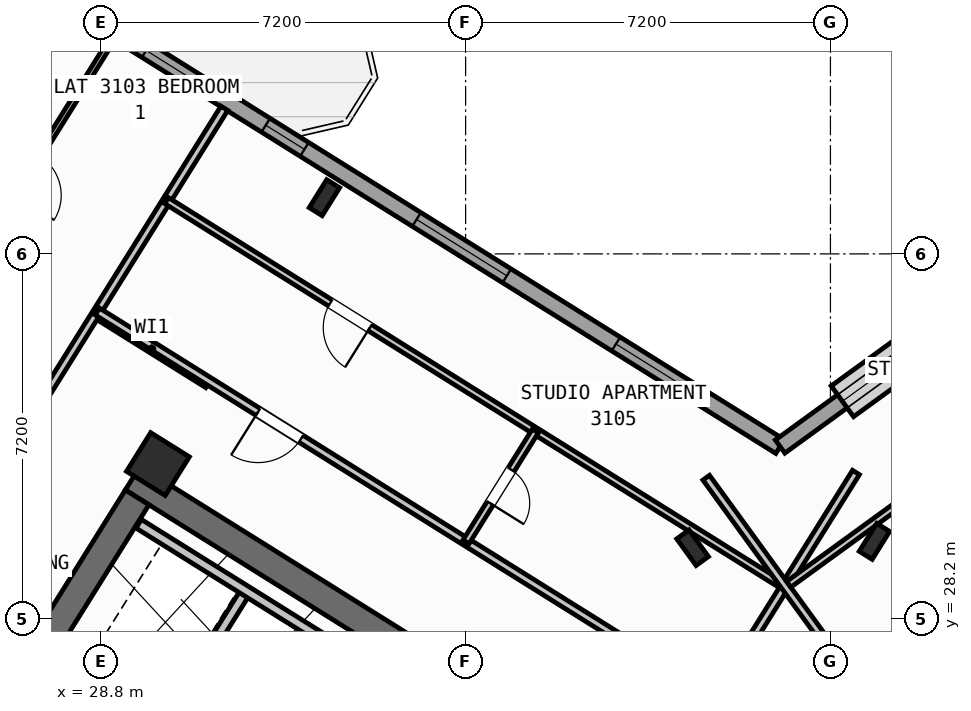
"""IFC4 building model, lengths in metres.
Left out: names, types, materials, properties, quantities, classifications, styles, units other than length and angle.
Written with IfcOpenShell. Run it as: python <this file> out.ifc"""

import sys

from ifc_helpers import new_model, si_unit, direction, frame, frame_2d, origin, origin_2d, place, context, subcontext, project, spatial, rectangle, hollow_rectangle, i_section, extrude, source, transform, mapped, element, fill, save


model = new_model("IFC4")
c1 = context("Model", 3, precision=1e-05, world=origin(), true_north=direction((0.0, 1.0)))
c2 = subcontext(c1, "Body", "Model", "MODEL_VIEW")
j1 = project(units=[si_unit("LENGTHUNIT", "METRE"), si_unit("PLANEANGLEUNIT", "RADIAN")], contexts=[c1])
p1 = place(None, origin())
s1 = spatial("IfcSite", under=j1, at=p1, CompositionType="ELEMENT")
p2 = place(p1, origin())
s2 = spatial("IfcBuilding", under=s1, at=p2, CompositionType="ELEMENT")
p3 = place(p2, frame((0.0, 0.0, 123.3)))
s3 = spatial("IfcBuildingStorey", under=s2, at=p3, CompositionType="ELEMENT", Elevation=123.3)
p4 = place(p3, frame((40.573, 24.01, 0.0), z_axis=(0.0, 0.0, 1.0), x_axis=(-0.848047359947, 0.529920442413, 0.0)))
e1 = element("IfcWall", 1, at=p4, inside=s3, PredefinedType="SHEAR", context=c2, shape_type="SweptSolid", body=[
    extrude(rectangle(XDim=13.14, YDim=0.55, at=frame_2d((6.57, 0.0))), origin(), (0.0, 0.0, 1.0), 4.22),
])
p5 = place(p3, frame((29.517, 30.594, 0.0), z_axis=(0.0, 0.0, 1.0), x_axis=(-0.529906864564, -0.848055844204, 0.0)))
e2 = element("IfcWall", 2, at=p5, inside=s3, PredefinedType="SHEAR", context=c2, shape_type="SweptSolid", body=[
    extrude(rectangle(XDim=3.575, YDim=0.55, at=frame_2d((1.788, 0.0))), origin(), (0.0, 0.0, 1.0), 4.22),
])
p6 = place(p3, frame((44.365, 24.142, 0.0), z_axis=(0.0, 0.0, 1.0), x_axis=(0.809024304885, 0.587775190107, 0.0)))
e3 = element("IfcWall", 3, at=p6, inside=s3, PredefinedType="SHEAR", context=c2, shape_type="SweptSolid", body=[
    extrude(rectangle(XDim=12.34, YDim=0.55, at=frame_2d((6.17, 0.0))), origin(), (0.0, 0.0, 1.0), 4.22),
])
m1 = source(origin(), c2, "Body", "SweptSolid", [
    extrude(i_section(OverallWidth=0.3, OverallDepth=0.65, WebThickness=0.016, FlangeThickness=0.031, at=origin_2d()), origin(), (0.0, 0.0, 1.0), 4.5),
])
for number, where, z_axis, x_axis in (
    (4, (44.068, 29.726, 0.0), (0.0, 0.0, 1.0), (-0.848, 0.53, 0.0)),
    (5, (33.213, 36.509, 0.0), (0.0, 0.0, 1.0), (-0.848, 0.53, 0.0)),
):
    element("IfcColumn", number, at=place(p3, frame(where, z_axis=z_axis, x_axis=x_axis)), inside=s3, PredefinedType="COLUMN", context=c2, shape_type="MappedRepresentation", body=[
        mapped(m1, transform((0.0, 0.0, 0.0), scale=1.0)),
    ])
m2 = source(origin(), c2, "Body", "SweptSolid", [
    extrude(hollow_rectangle(XDim=0.9, YDim=0.9, WallThickness=0.036, at=origin_2d()), origin(), (0.0, 0.0, 1.0), 4.5),
])
p7 = place(p3, frame((29.928, 31.251, 0.0), z_axis=(0.0, 0.0, 1.0), x_axis=(-0.848048096156, 0.529919264233, 0.0)))
e6 = element("IfcColumn", 6, at=p7, inside=s3, PredefinedType="COLUMN", context=c2, shape_type="MappedRepresentation", body=[
    mapped(m2, transform((0.0, 0.0, 0.0), scale=1.0)),
])
p8 = place(p3, frame((40.479, 29.601, 0.0), z_axis=(0.0, 0.0, 1.0), x_axis=(0.809016994375, 0.587785252292, 0.0)))
e7 = element("IfcColumn", 7, at=p8, inside=s3, PredefinedType="COLUMN", context=c2, shape_type="MappedRepresentation", body=[
    mapped(m1, transform((0.0, 0.0, 0.0), scale=1.0)),
])
p9 = place(p3, frame((31.76, 12.183, 0.0), z_axis=(0.0, 0.0, 1.0), x_axis=(-0.848047074256, 0.529920899612, 0.0)))
e8 = element("IfcWall", 8, at=p9, inside=s3, PredefinedType="STANDARD", context=c2, shape_type="SweptSolid", body=[
    extrude(rectangle(XDim=30.652, YDim=0.32, at=frame_2d((15.326, 0.0))), origin(), (0.0, 0.0, 1.0), 4.22),
])
p10 = place(p9, frame((14.966, 0.0, 0.0)))
e9 = element("IfcOpeningElement", 9, at=p10, cuts=e8, PredefinedType="OPENING", context=c2, shape_type="SweptSolid", body=[
    extrude(rectangle(XDim=1.2, YDim=2.15, at=frame_2d((0.6, 1.075))), frame((0.0, 0.17, 0.0), z_axis=(0.0, -1.0, 0.0), x_axis=(1.0, 0.0, 0.0)), (0.0, 0.0, 1.0), 0.34),
])
p11 = place(p9, frame((1.871, 0.0, 0.8)))
e10 = element("IfcOpeningElement", 10, at=p11, cuts=e8, PredefinedType="OPENING", context=c2, shape_type="SweptSolid", body=[
    extrude(rectangle(XDim=2.1, YDim=1.55, at=frame_2d((1.05, 0.775))), frame((0.0, 0.17, 0.0), z_axis=(0.0, -1.0, 0.0), x_axis=(1.0, 0.0, 0.0)), (0.0, 0.0, 1.0), 0.34),
])
p12 = place(p9, frame((6.546, 0.0, 0.8)))
e11 = element("IfcOpeningElement", 11, at=p12, cuts=e8, PredefinedType="OPENING", context=c2, shape_type="SweptSolid", body=[
    extrude(rectangle(XDim=2.1, YDim=1.55, at=frame_2d((1.05, 0.775))), frame((0.0, 0.17, 0.0), z_axis=(0.0, -1.0, 0.0), x_axis=(1.0, 0.0, 0.0)), (0.0, 0.0, 1.0), 0.34),
])
p13 = place(p9, frame((20.508, 0.0, 0.85)))
e12 = element("IfcOpeningElement", 12, at=p13, cuts=e8, PredefinedType="OPENING", context=c2, shape_type="SweptSolid", body=[
    extrude(rectangle(XDim=1.5, YDim=1.5, at=frame_2d((0.75, 0.75))), frame((0.0, 0.17, 0.0), z_axis=(0.0, -1.0, 0.0), x_axis=(1.0, 0.0, 0.0)), (0.0, 0.0, 1.0), 0.34),
])
p14 = place(p9, frame((27.253, 0.0, 0.95)))
e13 = element("IfcOpeningElement", 13, at=p14, cuts=e8, PredefinedType="OPENING", context=c2, shape_type="SweptSolid", body=[
    extrude(rectangle(XDim=1.2, YDim=1.4, at=frame_2d((0.6, 0.7))), frame((0.0, 0.17, 0.0), z_axis=(0.0, -1.0, 0.0), x_axis=(1.0, 0.0, 0.0)), (0.0, 0.0, 1.0), 0.34),
])
p15 = place(p3, frame((17.424, 47.083, 0.0), z_axis=(0.0, 0.0, 1.0), x_axis=(0.848049927979, -0.529916332693, 0.0)))
e14 = element("IfcWall", 14, at=p15, inside=s3, PredefinedType="STANDARD", context=c2, shape_type="SweptSolid", body=[
    extrude(rectangle(XDim=29.223, YDim=0.32, at=frame_2d((14.612, 0.0))), origin(), (0.0, 0.0, 1.0), 4.22),
])
p16 = place(p15, frame((8.839, 0.0, 0.0)))
e15 = element("IfcOpeningElement", 15, at=p16, cuts=e14, PredefinedType="OPENING", context=c2, shape_type="SweptSolid", body=[
    extrude(rectangle(XDim=1.05, YDim=2.15, at=frame_2d((0.525, 1.075))), frame((0.0, 0.17, 0.0), z_axis=(0.0, -1.0, 0.0), x_axis=(1.0, 0.0, 0.0)), (0.0, 0.0, 1.0), 0.34),
])
p17 = place(p15, frame((0.719, 0.0, 0.85)))
e16 = element("IfcOpeningElement", 16, at=p17, cuts=e14, PredefinedType="OPENING", context=c2, shape_type="SweptSolid", body=[
    extrude(rectangle(XDim=1.8, YDim=1.5, at=frame_2d((0.9, 0.75))), frame((0.0, 0.17, 0.0), z_axis=(0.0, -1.0, 0.0), x_axis=(1.0, 0.0, 0.0)), (0.0, 0.0, 1.0), 0.34),
])
p18 = place(p15, frame((3.981, 0.0, 0.85)))
e17 = element("IfcOpeningElement", 17, at=p18, cuts=e14, PredefinedType="OPENING", context=c2, shape_type="SweptSolid", body=[
    extrude(rectangle(XDim=1.5, YDim=1.5, at=frame_2d((0.75, 0.75))), frame((0.0, 0.17, 0.0), z_axis=(0.0, -1.0, 0.0), x_axis=(1.0, 0.0, 0.0)), (0.0, 0.0, 1.0), 0.34),
])
p19 = place(p15, frame((7.021, 0.0, 0.95)))
e18 = element("IfcOpeningElement", 18, at=p19, cuts=e14, PredefinedType="OPENING", context=c2, shape_type="SweptSolid", body=[
    extrude(rectangle(XDim=1.2, YDim=1.4, at=frame_2d((0.6, 0.7))), frame((0.0, 0.17, 0.0), z_axis=(0.0, -1.0, 0.0), x_axis=(1.0, 0.0, 0.0)), (0.0, 0.0, 1.0), 0.34),
])
p20 = place(p15, frame((14.471, 0.0, 0.95)))
e19 = element("IfcOpeningElement", 19, at=p20, cuts=e14, PredefinedType="OPENING", context=c2, shape_type="SweptSolid", body=[
    extrude(rectangle(XDim=1.2, YDim=1.4, at=frame_2d((0.6, 0.7))), frame((0.0, 0.17, 0.0), z_axis=(0.0, -1.0, 0.0), x_axis=(1.0, 0.0, 0.0)), (0.0, 0.0, 1.0), 0.34),
])
p21 = place(p15, frame((17.254, 0.0, 1.0)))
e20 = element("IfcOpeningElement", 20, at=p21, cuts=e14, PredefinedType="OPENING", context=c2, shape_type="SweptSolid", body=[
    extrude(rectangle(XDim=0.9, YDim=1.25, at=frame_2d((0.45, 0.625))), frame((0.0, 0.17, 0.0), z_axis=(0.0, -1.0, 0.0), x_axis=(1.0, 0.0, 0.0)), (0.0, 0.0, 1.0), 0.34),
])
p22 = place(p15, frame((20.764, 0.0, 0.8)))
e21 = element("IfcOpeningElement", 21, at=p22, cuts=e14, PredefinedType="OPENING", context=c2, shape_type="SweptSolid", body=[
    extrude(rectangle(XDim=2.1, YDim=1.55, at=frame_2d((1.05, 0.775))), frame((0.0, 0.17, 0.0), z_axis=(0.0, -1.0, 0.0), x_axis=(1.0, 0.0, 0.0)), (0.0, 0.0, 1.0), 0.34),
])
p23 = place(p15, frame((25.403, 0.0, 0.8)))
e22 = element("IfcOpeningElement", 22, at=p23, cuts=e14, PredefinedType="OPENING", context=c2, shape_type="SweptSolid", body=[
    extrude(rectangle(XDim=2.1, YDim=1.55, at=frame_2d((1.05, 0.775))), frame((0.0, 0.17, 0.0), z_axis=(0.0, -1.0, 0.0), x_axis=(1.0, 0.0, 0.0)), (0.0, 0.0, 1.0), 0.34),
])
p24 = place(p3, frame((42.207, 31.597, 0.0), z_axis=(0.0, 0.0, 1.0), x_axis=(0.809020333377, 0.587780656523, 0.0)))
e23 = element("IfcWall", 23, at=p24, inside=s3, PredefinedType="STANDARD", context=c2, shape_type="SweptSolid", body=[
    extrude(rectangle(XDim=15.223, YDim=0.32, at=frame_2d((7.611, 0.0))), origin(), (0.0, 0.0, 1.0), 4.22),
])
p25 = place(p24, frame((12.82, 0.0, 0.0)))
e24 = element("IfcOpeningElement", 24, at=p25, cuts=e23, PredefinedType="OPENING", context=c2, shape_type="SweptSolid", body=[
    extrude(rectangle(XDim=1.05, YDim=2.15, at=frame_2d((0.525, 1.075))), frame((0.0, 0.17, 0.0), z_axis=(0.0, -1.0, 0.0), x_axis=(1.0, 0.0, 0.0)), (0.0, 0.0, 1.0), 0.34),
])
p26 = place(p24, frame((1.52, 0.0, 0.8)))
e25 = element("IfcOpeningElement", 25, at=p26, cuts=e23, PredefinedType="OPENING", context=c2, shape_type="SweptSolid", body=[
    extrude(rectangle(XDim=2.1, YDim=1.55, at=frame_2d((1.05, 0.775))), frame((0.0, 0.17, 0.0), z_axis=(0.0, -1.0, 0.0), x_axis=(1.0, 0.0, 0.0)), (0.0, 0.0, 1.0), 0.34),
])
p27 = place(p24, frame((5.76, 0.0, 0.8)))
e26 = element("IfcOpeningElement", 26, at=p27, cuts=e23, PredefinedType="OPENING", context=c2, shape_type="SweptSolid", body=[
    extrude(rectangle(XDim=2.1, YDim=1.55, at=frame_2d((1.05, 0.775))), frame((0.0, 0.17, 0.0), z_axis=(0.0, -1.0, 0.0), x_axis=(1.0, 0.0, 0.0)), (0.0, 0.0, 1.0), 0.34),
])
p28 = place(p24, frame((10.219, 0.0, 1.0)))
e27 = element("IfcOpeningElement", 27, at=p28, cuts=e23, PredefinedType="OPENING", context=c2, shape_type="SweptSolid", body=[
    extrude(rectangle(XDim=0.9, YDim=1.25, at=frame_2d((0.45, 0.625))), frame((0.0, 0.17, 0.0), z_axis=(0.0, -1.0, 0.0), x_axis=(1.0, 0.0, 0.0)), (0.0, 0.0, 1.0), 0.34),
])
p29 = place(p3, frame((31.645, 28.716, 0.0), z_axis=(0.0, 0.0, 1.0), x_axis=(-0.52986693015, -0.848080795876, 0.0)))
e28 = element("IfcWall", 28, at=p29, inside=s3, PredefinedType="STANDARD", context=c2, shape_type="SweptSolid", body=[
    extrude(rectangle(XDim=2.66, YDim=0.2, at=frame_2d((1.33, 0.0))), origin(), (0.0, 0.0, 1.0), 4.21),
])
p30 = place(p3, frame((33.363, 27.69, 0.0), z_axis=(0.0, 0.0, 1.0), x_axis=(-0.848047090064, 0.529920874315, 0.0)))
e29 = element("IfcWall", 29, at=p30, inside=s3, PredefinedType="STANDARD", context=c2, shape_type="SweptSolid", body=[
    extrude(rectangle(XDim=4.498, YDim=0.2, at=frame_2d((2.249, 0.0))), origin(), (0.0, 0.0, 1.0), 4.21),
])
p31 = place(p3, frame((30.914, 32.829, 0.0), z_axis=(0.0, 0.0, 1.0), x_axis=(-0.848008813643, 0.529982124211, 0.0)))
e30 = element("IfcWall", 30, at=p31, inside=s3, PredefinedType="PARTITIONING", context=c2, shape_type="SweptSolid", body=[
    extrude(rectangle(XDim=2.61, YDim=0.16, at=frame_2d((1.305, 0.0))), origin(), (0.0, 0.0, 1.0), 4.21),
])
p32 = place(p3, frame((31.239, 38.274, 0.0), z_axis=(0.0, 0.0, 1.0), x_axis=(-0.529920220799, -0.848047498427, 0.0)))
e31 = element("IfcWall", 31, at=p32, inside=s3, PredefinedType="PARTITIONING", context=c2, shape_type="SweptSolid", body=[
    extrude(rectangle(XDim=9.2, YDim=0.16, at=frame_2d((4.6, 0.0))), origin(), (0.0, 0.0, 1.0), 4.21),
])
p33 = place(p3, frame((29.177, 39.881, 0.0), z_axis=(0.0, 0.0, 1.0), x_axis=(-0.529930649952, -0.848040981463, 0.0)))
e32 = element("IfcWall", 32, at=p33, inside=s3, PredefinedType="PARTITIONING", context=c2, shape_type="SweptSolid", body=[
    extrude(rectangle(XDim=7.07, YDim=0.11, at=frame_2d((3.535, 0.0))), origin(), (0.0, 0.0, 1.0), 4.21),
])
p34 = place(p33, frame((3.0, 0.0, 0.0)))
e33 = element("IfcOpeningElement", 33, at=p34, cuts=e32, PredefinedType="OPENING", context=c2, shape_type="SweptSolid", body=[
    extrude(rectangle(XDim=0.92, YDim=2.08, at=frame_2d((0.46, 1.04))), frame((0.0, 0.065, 0.0), z_axis=(0.0, -1.0, 0.0), x_axis=(1.0, 0.0, 0.0)), (0.0, 0.0, 1.0), 0.13),
])
p35 = place(p3, frame((41.936, 26.012, 0.0), z_axis=(0.0, 0.0, 1.0), x_axis=(-0.848051154596, 0.529914369676, 0.0)))
e34 = element("IfcWall", 34, at=p35, inside=s3, PredefinedType="PARTITIONING", context=c2, shape_type="SweptSolid", body=[
    extrude(rectangle(XDim=15.57, YDim=0.16, at=frame_2d((7.785, 0.0))), origin(), (0.0, 0.0, 1.0), 4.21),
])
p36 = place(p35, frame((10.83, 0.0, 0.0)))
e35 = element("IfcOpeningElement", 35, at=p36, cuts=e34, PredefinedType="OPENING", context=c2, shape_type="SweptSolid", body=[
    extrude(rectangle(XDim=1.0, YDim=2.1, at=frame_2d((0.5, 1.05))), frame((0.0, 0.09, 0.0), z_axis=(0.0, -1.0, 0.0), x_axis=(1.0, 0.0, 0.0)), (0.0, 0.0, 1.0), 0.18),
])
p37 = place(p3, frame((43.704, 31.086, 0.0), z_axis=(0.0, 0.0, 1.0), x_axis=(-0.529906828443, -0.848055866774, 0.0)))
e36 = element("IfcWall", 36, at=p37, inside=s3, PredefinedType="PARTITIONING", context=c2, shape_type="SweptSolid", body=[
    extrude(rectangle(XDim=5.48, YDim=0.16, at=frame_2d((2.74, 0.0))), origin(), (0.0, 0.0, 1.0), 4.21),
])
p38 = place(p3, frame((42.226, 28.873, 0.0), z_axis=(0.0, 0.0, 1.0), x_axis=(-0.848049134363, 0.529917602752, 0.0)))
e37 = element("IfcWall", 37, at=p38, inside=s3, PredefinedType="PLUMBINGWALL", context=c2, shape_type="SweptSolid", body=[
    extrude(rectangle(XDim=14.3, YDim=0.14, at=frame_2d((7.15, 0.0))), origin(), (0.0, 0.0, 1.0), 4.21),
])
p39 = place(p38, frame((9.57, 0.0, 0.0)))
e38 = element("IfcOpeningElement", 38, at=p39, cuts=e37, PredefinedType="OPENING", context=c2, shape_type="SweptSolid", body=[
    extrude(rectangle(XDim=0.92, YDim=2.08, at=frame_2d((0.46, 1.04))), frame((0.0, 0.08, 0.0), z_axis=(0.0, -1.0, 0.0), x_axis=(1.0, 0.0, 0.0)), (0.0, 0.0, 1.0), 0.16),
])
p40 = place(p3, frame((37.375, 31.904, 0.0), z_axis=(0.0, 0.0, 1.0), x_axis=(-0.529913878929, -0.848051461244, 0.0)))
e39 = element("IfcWall", 39, at=p40, inside=s3, PredefinedType="PLUMBINGWALL", context=c2, shape_type="SweptSolid", body=[
    extrude(rectangle(XDim=2.58, YDim=0.14, at=frame_2d((1.29, 0.0))), origin(), (0.0, 0.0, 1.0), 4.21),
])
p41 = place(p40, frame((0.9, 0.0, 0.0)))
e40 = element("IfcOpeningElement", 40, at=p41, cuts=e39, PredefinedType="OPENING", context=c2, shape_type="SweptSolid", body=[
    extrude(rectangle(XDim=0.78, YDim=2.05, at=frame_2d((0.39, 1.025))), frame((0.0, 0.08, 0.0), z_axis=(0.0, -1.0, 0.0), x_axis=(1.0, 0.0, 0.0)), (0.0, 0.0, 1.0), 0.16),
])
p42 = place(p3, frame((42.866, 26.044, 0.0), z_axis=(0.0, 0.0, 1.0), x_axis=(0.809020254154, 0.587780765566, 0.0)))
e41 = element("IfcWall", 41, at=p42, inside=s3, PredefinedType="PARTITIONING", context=c2, shape_type="SweptSolid", body=[
    extrude(rectangle(XDim=14.67, YDim=0.16, at=frame_2d((7.335, 0.0))), origin(), (0.0, 0.0, 1.0), 4.21),
])
p43 = place(p42, frame((10.2, 0.0, 0.0)))
e42 = element("IfcOpeningElement", 42, at=p43, cuts=e41, PredefinedType="OPENING", context=c2, shape_type="SweptSolid", body=[
    extrude(rectangle(XDim=1.0, YDim=2.1, at=frame_2d((0.5, 1.05))), frame((0.0, 0.09, 0.0), z_axis=(0.0, -1.0, 0.0), x_axis=(1.0, 0.0, 0.0)), (0.0, 0.0, 1.0), 0.18),
])
p44 = place(p3, frame((43.969, 26.55, 0.0), z_axis=(0.0, 0.0, 1.0), x_axis=(-0.587776919386, 0.80902304852, 0.0)))
e43 = element("IfcWall", 43, at=p44, inside=s3, PredefinedType="PARTITIONING", context=c2, shape_type="SweptSolid", body=[
    extrude(rectangle(XDim=5.48, YDim=0.16, at=frame_2d((2.74, 0.0))), origin(), (0.0, 0.0, 1.0), 4.21),
])
p45 = place(p3, frame((42.377, 28.878, 0.0), z_axis=(0.0, 0.0, 1.0), x_axis=(0.809020411523, 0.587780548963, 0.0)))
e44 = element("IfcWall", 44, at=p45, inside=s3, PredefinedType="PLUMBINGWALL", context=c2, shape_type="SweptSolid", body=[
    extrude(rectangle(XDim=13.4, YDim=0.14, at=frame_2d((6.7, 0.0))), origin(), (0.0, 0.0, 1.0), 4.21),
])
p46 = place(p45, frame((8.94, 0.0, 0.0)))
e45 = element("IfcOpeningElement", 45, at=p46, cuts=e44, PredefinedType="OPENING", context=c2, shape_type="SweptSolid", body=[
    extrude(rectangle(XDim=0.92, YDim=2.08, at=frame_2d((0.46, 1.04))), frame((0.0, 0.08, 0.0), z_axis=(0.0, -1.0, 0.0), x_axis=(1.0, 0.0, 0.0)), (0.0, 0.0, 1.0), 0.16),
])
m3 = source(origin(), c2, "Body", "SweptSolid", [
    extrude(rectangle(XDim=1.2, YDim=1.4, at=frame_2d((0.6, 0.7))), frame((0.0, 0.03, 0.0), z_axis=(0.0, -1.0, 0.0), x_axis=(1.0, 0.0, 0.0)), (0.0, 0.0, 1.0), 0.06),
])
p47 = place(p20, origin())
e46 = element("IfcWindow", 46, at=p47, inside=s3, PartitioningType="SINGLE_PANEL", PredefinedType="WINDOW", context=c2, shape_type="MappedRepresentation", body=[
    mapped(m3, transform((0.0, 0.0, 0.0), scale=1.0)),
])
fill(e19, e46)
m4 = source(origin(), c2, "Body", "SweptSolid", [
    extrude(rectangle(XDim=0.9, YDim=1.25, at=frame_2d((0.45, 0.625))), frame((0.0, 0.03, 0.0), z_axis=(0.0, -1.0, 0.0), x_axis=(1.0, 0.0, 0.0)), (0.0, 0.0, 1.0), 0.06),
])
p48 = place(p21, origin())
e47 = element("IfcWindow", 47, at=p48, inside=s3, PartitioningType="SINGLE_PANEL", PredefinedType="WINDOW", context=c2, shape_type="MappedRepresentation", body=[
    mapped(m4, transform((0.0, 0.0, 0.0), scale=1.0)),
])
fill(e20, e47)
m5 = source(origin(), c2, "Body", "SweptSolid", [
    extrude(rectangle(XDim=2.1, YDim=1.55, at=frame_2d((1.05, 0.775))), frame((0.0, 0.03, 0.0), z_axis=(0.0, -1.0, 0.0), x_axis=(1.0, 0.0, 0.0)), (0.0, 0.0, 1.0), 0.06),
])
p49 = place(p22, origin())
e48 = element("IfcWindow", 48, at=p49, inside=s3, PartitioningType="SINGLE_PANEL", PredefinedType="WINDOW", context=c2, shape_type="MappedRepresentation", body=[
    mapped(m5, transform((0.0, 0.0, 0.0), scale=1.0)),
])
fill(e21, e48)
p50 = place(p23, origin())
e49 = element("IfcWindow", 49, at=p50, inside=s3, PartitioningType="SINGLE_PANEL", PredefinedType="WINDOW", context=c2, shape_type="MappedRepresentation", body=[
    mapped(m5, transform((0.0, 0.0, 0.0), scale=1.0)),
])
fill(e22, e49)
p51 = place(p26, origin())
e50 = element("IfcWindow", 50, at=p51, inside=s3, PartitioningType="SINGLE_PANEL", PredefinedType="WINDOW", context=c2, shape_type="MappedRepresentation", body=[
    mapped(m5, transform((0.0, 0.0, 0.0), scale=1.0)),
])
fill(e25, e50)
m6 = source(origin(), c2, "Body", "SweptSolid", [
    extrude(rectangle(XDim=1.0, YDim=2.1, at=frame_2d((0.5, 1.05))), frame((0.0, 0.025, 0.0), z_axis=(0.0, -1.0, 0.0), x_axis=(1.0, 0.0, 0.0)), (0.0, 0.0, 1.0), 0.05),
])
p52 = place(p36, origin())
e51 = element("IfcDoor", 51, at=p52, inside=s3, OperationType="SINGLE_SWING_RIGHT", PredefinedType="DOOR", context=c2, shape_type="MappedRepresentation", body=[
    mapped(m6, transform((0.0, 0.0, 0.0), scale=1.0)),
])
fill(e35, e51)
m7 = source(origin(), c2, "Body", "SweptSolid", [
    extrude(rectangle(XDim=0.92, YDim=2.08, at=frame_2d((0.46, 1.04))), frame((0.0, 0.025, 0.0), z_axis=(0.0, -1.0, 0.0), x_axis=(1.0, 0.0, 0.0)), (0.0, 0.0, 1.0), 0.05),
])
p53 = place(p39, origin())
e52 = element("IfcDoor", 52, at=p53, inside=s3, OperationType="SINGLE_SWING_LEFT", PredefinedType="DOOR", context=c2, shape_type="MappedRepresentation", body=[
    mapped(m7, transform((0.0, 0.0, 0.0), scale=1.0)),
])
fill(e38, e52)
m8 = source(origin(), c2, "Body", "SweptSolid", [
    extrude(rectangle(XDim=0.78, YDim=2.05, at=frame_2d((0.39, 1.025))), frame((0.0, 0.025, 0.0), z_axis=(0.0, -1.0, 0.0), x_axis=(1.0, 0.0, 0.0)), (0.0, 0.0, 1.0), 0.05),
])
p54 = place(p41, origin())
e53 = element("IfcDoor", 53, at=p54, inside=s3, OperationType="SINGLE_SWING_RIGHT", PredefinedType="DOOR", context=c2, shape_type="MappedRepresentation", body=[
    mapped(m8, transform((0.0, 0.0, 0.0), scale=1.0)),
])
fill(e40, e53)
save(model, sys.argv[1])
